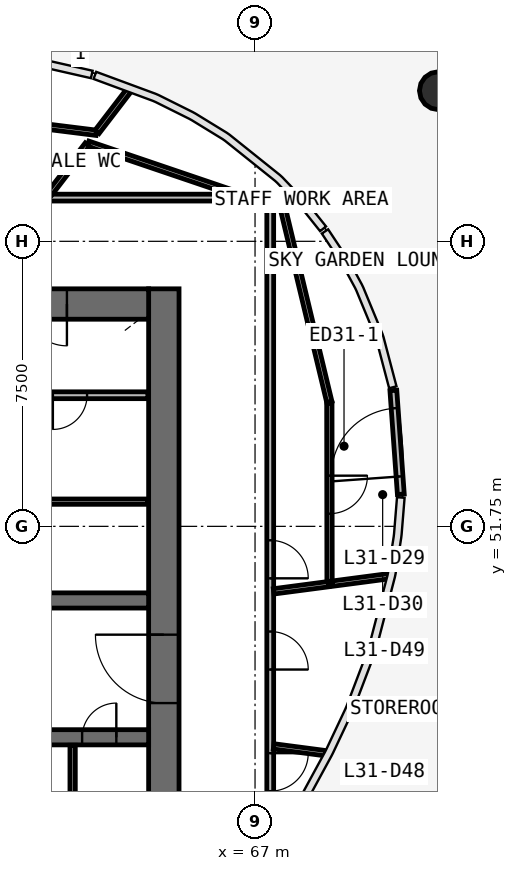
"""IFC4 building model, lengths in metres.
Left out: names, types, materials, properties, quantities, classifications, styles, units other than length and angle.
Written with IfcOpenShell. Run it as: python <this file> out.ifc"""

import sys

from ifc_helpers import new_model, si_unit, direction, frame, frame_2d, origin, origin_2d, place, context, subcontext, project, spatial, rectangle, circle, extrude, source, transform, mapped, element, fill, save


model = new_model("IFC4")
c1 = context("Model", 3, precision=1e-05, world=origin(), true_north=direction((0.0, 1.0)))
c2 = subcontext(c1, "Body", "Model", "MODEL_VIEW")
j1 = project(units=[si_unit("LENGTHUNIT", "METRE"), si_unit("PLANEANGLEUNIT", "RADIAN")], contexts=[c1])
p1 = place(None, origin())
s1 = spatial("IfcSite", under=j1, at=p1, CompositionType="ELEMENT")
p2 = place(p1, origin())
s2 = spatial("IfcBuilding", under=s1, at=p2, CompositionType="ELEMENT")
p3 = place(p2, frame((0.0, 0.0, 133.1)))
s3 = spatial("IfcBuildingStorey", under=s2, at=p3, CompositionType="ELEMENT", Elevation=133.1)
p4 = place(p3, frame((64.6, 38.0, 0.0), z_axis=(0.0, 0.0, 1.0), x_axis=(0.0, 1.0, 0.0)))
e1 = element("IfcWall", 1, at=p4, inside=s3, PredefinedType="SHEAR", context=c2, shape_type="SweptSolid", body=[
    extrude(rectangle(XDim=20.0, YDim=0.8, at=frame_2d((10.0, 0.0))), origin(), (0.0, 0.0, 1.0), 3.9),
])
p5 = place(p4, frame((9.1, 0.0, 0.0)))
e2 = element("IfcOpeningElement", 2, at=p5, cuts=e1, PredefinedType="OPENING", context=c2, shape_type="SweptSolid", body=[
    extrude(rectangle(XDim=1.8, YDim=2.1, at=frame_2d((0.9, 1.05))), frame((0.0, 0.41, 0.0), z_axis=(0.0, -1.0, 0.0), x_axis=(1.0, 0.0, 0.0)), (0.0, 0.0, 1.0), 0.82),
])
p6 = place(p3, frame((64.2, 57.6, 0.0), z_axis=(0.0, 0.0, 1.0), x_axis=(-1.0, 0.0, 0.0)))
e3 = element("IfcWall", 3, at=p6, inside=s3, PredefinedType="SHEAR", context=c2, shape_type="SweptSolid", body=[
    extrude(rectangle(XDim=24.4, YDim=0.8, at=frame_2d((12.2, 0.0))), origin(), (0.0, 0.0, 1.0), 3.9),
])
p7 = place(p6, frame((21.65, 0.0, 0.0)))
e4 = element("IfcOpeningElement", 4, at=p7, cuts=e3, PredefinedType="OPENING", context=c2, shape_type="SweptSolid", body=[
    extrude(rectangle(XDim=1.1, YDim=2.1, at=frame_2d((0.55, 1.05))), frame((0.0, 0.41, 0.0), z_axis=(0.0, -1.0, 0.0), x_axis=(1.0, 0.0, 0.0)), (0.0, 0.0, 1.0), 0.82),
])
p8 = place(p6, frame((2.15, 0.0, 0.0)))
e5 = element("IfcOpeningElement", 5, at=p8, cuts=e3, PredefinedType="OPENING", context=c2, shape_type="SweptSolid", body=[
    extrude(rectangle(XDim=1.1, YDim=2.1, at=frame_2d((0.55, 1.05))), frame((0.0, 0.41, 0.0), z_axis=(0.0, -1.0, 0.0), x_axis=(1.0, 0.0, 0.0)), (0.0, 0.0, 1.0), 0.82),
])
p9 = place(p3, frame((39.8, 49.8, 0.0), z_axis=(0.0, 0.0, 1.0), x_axis=(1.0, 0.0, 0.0)))
e6 = element("IfcWall", 6, at=p9, inside=s3, PredefinedType="SHEAR", context=c2, shape_type="SweptSolid", body=[
    extrude(rectangle(XDim=24.4, YDim=0.4, at=frame_2d((12.2, 0.0))), origin(), (0.0, 0.0, 1.0), 3.9),
])
p10 = place(p9, frame((13.6, 0.0, 0.0)))
e7 = element("IfcOpeningElement", 7, at=p10, cuts=e6, PredefinedType="OPENING", context=c2, shape_type="SweptSolid", body=[
    extrude(rectangle(XDim=1.1, YDim=2.1, at=frame_2d((0.55, 1.05))), frame((0.0, 0.21, 0.0), z_axis=(0.0, -1.0, 0.0), x_axis=(1.0, 0.0, 0.0)), (0.0, 0.0, 1.0), 0.42),
])
p11 = place(p9, frame((16.1, 0.0, 0.0)))
e8 = element("IfcOpeningElement", 8, at=p11, cuts=e6, PredefinedType="OPENING", context=c2, shape_type="SweptSolid", body=[
    extrude(rectangle(XDim=1.1, YDim=2.1, at=frame_2d((0.55, 1.05))), frame((0.0, 0.21, 0.0), z_axis=(0.0, -1.0, 0.0), x_axis=(1.0, 0.0, 0.0)), (0.0, 0.0, 1.0), 0.42),
])
p12 = place(p9, frame((18.6, 0.0, 0.0)))
e9 = element("IfcOpeningElement", 9, at=p12, cuts=e6, PredefinedType="OPENING", context=c2, shape_type="SweptSolid", body=[
    extrude(rectangle(XDim=1.1, YDim=2.1, at=frame_2d((0.55, 1.05))), frame((0.0, 0.21, 0.0), z_axis=(0.0, -1.0, 0.0), x_axis=(1.0, 0.0, 0.0)), (0.0, 0.0, 1.0), 0.42),
])
p13 = place(p9, frame((4.7, 0.0, 0.0)))
e10 = element("IfcOpeningElement", 10, at=p13, cuts=e6, PredefinedType="OPENING", context=c2, shape_type="SweptSolid", body=[
    extrude(rectangle(XDim=1.1, YDim=2.1, at=frame_2d((0.55, 1.05))), frame((0.0, 0.21, 0.0), z_axis=(0.0, -1.0, 0.0), x_axis=(1.0, 0.0, 0.0)), (0.0, 0.0, 1.0), 0.42),
])
p14 = place(p9, frame((7.2, 0.0, 0.0)))
e11 = element("IfcOpeningElement", 11, at=p14, cuts=e6, PredefinedType="OPENING", context=c2, shape_type="SweptSolid", body=[
    extrude(rectangle(XDim=1.1, YDim=2.1, at=frame_2d((0.55, 1.05))), frame((0.0, 0.21, 0.0), z_axis=(0.0, -1.0, 0.0), x_axis=(1.0, 0.0, 0.0)), (0.0, 0.0, 1.0), 0.42),
])
p15 = place(p9, frame((9.7, 0.0, 0.0)))
e12 = element("IfcOpeningElement", 12, at=p15, cuts=e6, PredefinedType="OPENING", context=c2, shape_type="SweptSolid", body=[
    extrude(rectangle(XDim=1.1, YDim=2.1, at=frame_2d((0.55, 1.05))), frame((0.0, 0.21, 0.0), z_axis=(0.0, -1.0, 0.0), x_axis=(1.0, 0.0, 0.0)), (0.0, 0.0, 1.0), 0.42),
])
p16 = place(p9, frame((20.65, 0.0, 0.0)))
e13 = element("IfcOpeningElement", 13, at=p16, cuts=e6, PredefinedType="OPENING", context=c2, shape_type="SweptSolid", body=[
    extrude(rectangle(XDim=0.9, YDim=2.1, at=frame_2d((0.45, 1.05))), frame((0.0, 0.21, 0.0), z_axis=(0.0, -1.0, 0.0), x_axis=(1.0, 0.0, 0.0)), (0.0, 0.0, 1.0), 0.42),
])
p17 = place(p9, frame((11.85, 0.0, 0.0)))
e14 = element("IfcOpeningElement", 14, at=p17, cuts=e6, PredefinedType="OPENING", context=c2, shape_type="SweptSolid", body=[
    extrude(rectangle(XDim=0.9, YDim=2.1, at=frame_2d((0.45, 1.05))), frame((0.0, 0.21, 0.0), z_axis=(0.0, -1.0, 0.0), x_axis=(1.0, 0.0, 0.0)), (0.0, 0.0, 1.0), 0.42),
])
p18 = place(p3, frame((39.8, 46.2, 0.0), z_axis=(0.0, 0.0, 1.0), x_axis=(1.0, 0.0, 0.0)))
e15 = element("IfcWall", 15, at=p18, inside=s3, PredefinedType="SHEAR", context=c2, shape_type="SweptSolid", body=[
    extrude(rectangle(XDim=24.4, YDim=0.4, at=frame_2d((12.2, 0.0))), origin(), (0.0, 0.0, 1.0), 3.9),
])
p19 = place(p18, frame((13.6, 0.0, 0.0)))
e16 = element("IfcOpeningElement", 16, at=p19, cuts=e15, PredefinedType="OPENING", context=c2, shape_type="SweptSolid", body=[
    extrude(rectangle(XDim=1.1, YDim=2.1, at=frame_2d((0.55, 1.05))), frame((0.0, 0.21, 0.0), z_axis=(0.0, -1.0, 0.0), x_axis=(1.0, 0.0, 0.0)), (0.0, 0.0, 1.0), 0.42),
])
p20 = place(p18, frame((16.1, 0.0, 0.0)))
e17 = element("IfcOpeningElement", 17, at=p20, cuts=e15, PredefinedType="OPENING", context=c2, shape_type="SweptSolid", body=[
    extrude(rectangle(XDim=1.1, YDim=2.1, at=frame_2d((0.55, 1.05))), frame((0.0, 0.21, 0.0), z_axis=(0.0, -1.0, 0.0), x_axis=(1.0, 0.0, 0.0)), (0.0, 0.0, 1.0), 0.42),
])
p21 = place(p18, frame((18.6, 0.0, 0.0)))
e18 = element("IfcOpeningElement", 18, at=p21, cuts=e15, PredefinedType="OPENING", context=c2, shape_type="SweptSolid", body=[
    extrude(rectangle(XDim=1.1, YDim=2.1, at=frame_2d((0.55, 1.05))), frame((0.0, 0.21, 0.0), z_axis=(0.0, -1.0, 0.0), x_axis=(1.0, 0.0, 0.0)), (0.0, 0.0, 1.0), 0.42),
])
p22 = place(p18, frame((4.7, 0.0, 0.0)))
e19 = element("IfcOpeningElement", 19, at=p22, cuts=e15, PredefinedType="OPENING", context=c2, shape_type="SweptSolid", body=[
    extrude(rectangle(XDim=1.1, YDim=2.1, at=frame_2d((0.55, 1.05))), frame((0.0, 0.21, 0.0), z_axis=(0.0, -1.0, 0.0), x_axis=(1.0, 0.0, 0.0)), (0.0, 0.0, 1.0), 0.42),
])
p23 = place(p18, frame((7.2, 0.0, 0.0)))
e20 = element("IfcOpeningElement", 20, at=p23, cuts=e15, PredefinedType="OPENING", context=c2, shape_type="SweptSolid", body=[
    extrude(rectangle(XDim=1.1, YDim=2.1, at=frame_2d((0.55, 1.05))), frame((0.0, 0.21, 0.0), z_axis=(0.0, -1.0, 0.0), x_axis=(1.0, 0.0, 0.0)), (0.0, 0.0, 1.0), 0.42),
])
p24 = place(p18, frame((9.7, 0.0, 0.0)))
e21 = element("IfcOpeningElement", 21, at=p24, cuts=e15, PredefinedType="OPENING", context=c2, shape_type="SweptSolid", body=[
    extrude(rectangle(XDim=1.1, YDim=2.1, at=frame_2d((0.55, 1.05))), frame((0.0, 0.21, 0.0), z_axis=(0.0, -1.0, 0.0), x_axis=(1.0, 0.0, 0.0)), (0.0, 0.0, 1.0), 0.42),
])
p25 = place(p18, frame((20.65, 0.0, 0.0)))
e22 = element("IfcOpeningElement", 22, at=p25, cuts=e15, PredefinedType="OPENING", context=c2, shape_type="SweptSolid", body=[
    extrude(rectangle(XDim=0.9, YDim=2.1, at=frame_2d((0.45, 1.05))), frame((0.0, 0.21, 0.0), z_axis=(0.0, -1.0, 0.0), x_axis=(1.0, 0.0, 0.0)), (0.0, 0.0, 1.0), 0.42),
])
p26 = place(p18, frame((22.65, 0.0, 0.0)))
e23 = element("IfcOpeningElement", 23, at=p26, cuts=e15, PredefinedType="OPENING", context=c2, shape_type="SweptSolid", body=[
    extrude(rectangle(XDim=0.9, YDim=2.1, at=frame_2d((0.45, 1.05))), frame((0.0, 0.21, 0.0), z_axis=(0.0, -1.0, 0.0), x_axis=(1.0, 0.0, 0.0)), (0.0, 0.0, 1.0), 0.42),
])
p27 = place(p18, frame((0.85, 0.0, 0.0)))
e24 = element("IfcOpeningElement", 24, at=p27, cuts=e15, PredefinedType="OPENING", context=c2, shape_type="SweptSolid", body=[
    extrude(rectangle(XDim=0.9, YDim=2.1, at=frame_2d((0.45, 1.05))), frame((0.0, 0.21, 0.0), z_axis=(0.0, -1.0, 0.0), x_axis=(1.0, 0.0, 0.0)), (0.0, 0.0, 1.0), 0.42),
])
p28 = place(p18, frame((2.85, 0.0, 0.0)))
e25 = element("IfcOpeningElement", 25, at=p28, cuts=e15, PredefinedType="OPENING", context=c2, shape_type="SweptSolid", body=[
    extrude(rectangle(XDim=0.9, YDim=2.1, at=frame_2d((0.45, 1.05))), frame((0.0, 0.21, 0.0), z_axis=(0.0, -1.0, 0.0), x_axis=(1.0, 0.0, 0.0)), (0.0, 0.0, 1.0), 0.42),
])
p29 = place(p18, frame((11.85, 0.0, 0.0)))
e26 = element("IfcOpeningElement", 26, at=p29, cuts=e15, PredefinedType="OPENING", context=c2, shape_type="SweptSolid", body=[
    extrude(rectangle(XDim=0.9, YDim=2.1, at=frame_2d((0.45, 1.05))), frame((0.0, 0.21, 0.0), z_axis=(0.0, -1.0, 0.0), x_axis=(1.0, 0.0, 0.0)), (0.0, 0.0, 1.0), 0.42),
])
m1 = source(origin(), c2, "Body", "SweptSolid", [
    extrude(circle(Radius=0.5, at=origin_2d()), origin(), (0.0, 0.0, 1.0), 4.22),
])
p30 = place(p3, frame((71.826, 63.213, -0.32), z_axis=(0.0, 0.0, 1.0), x_axis=(1.0, 0.0, 0.0)))
e27 = element("IfcColumn", 27, at=p30, inside=s3, PredefinedType="COLUMN", context=c2, shape_type="MappedRepresentation", body=[
    mapped(m1, transform((0.0, 0.0, 0.0), scale=1.0)),
])
p31 = place(p3, frame((70.836, 52.594, 0.0), z_axis=(0.0, 0.0, 1.0), x_axis=(-0.071747420295, 0.997422832945, 0.0)))
e28 = element("IfcWall", 28, at=p31, inside=s3, PredefinedType="STANDARD", context=c2, shape_type="SweptSolid", body=[
    extrude(rectangle(XDim=2.739, YDim=0.18, at=frame_2d((1.37, 0.0))), origin(), (0.0, 0.0, 1.0), 3.58),
])
p32 = place(p31, frame((0.469, 0.0, 0.0)))
e29 = element("IfcOpeningElement", 29, at=p32, cuts=e28, PredefinedType="OPENING", context=c2, shape_type="SweptSolid", body=[
    extrude(rectangle(XDim=1.8, YDim=2.4, at=frame_2d((0.9, 1.2))), frame((0.0, 0.1, 0.0), z_axis=(0.0, -1.0, 0.0), x_axis=(1.0, 0.0, 0.0)), (0.0, 0.0, 1.0), 0.2),
])
p33 = place(p3, frame((36.6, 60.4, 0.0), z_axis=(0.0, 0.0, 1.0), x_axis=(1.0, 0.0, 0.0)))
e30 = element("IfcWall", 30, at=p33, inside=s3, PredefinedType="PARTITIONING", context=c2, shape_type="SweptSolid", body=[
    extrude(rectangle(XDim=30.8, YDim=0.18, at=frame_2d((15.4, 0.0))), origin(), (0.0, 0.0, 1.0), 2.88),
])
p34 = place(p33, frame((22.25, 0.0, 0.0)))
e31 = element("IfcOpeningElement", 31, at=p34, cuts=e30, PredefinedType="OPENING", context=c2, shape_type="SweptSolid", body=[
    extrude(rectangle(XDim=0.9, YDim=2.1, at=frame_2d((0.45, 1.05))), frame((0.0, 0.1, 0.0), z_axis=(0.0, -1.0, 0.0), x_axis=(1.0, 0.0, 0.0)), (0.0, 0.0, 1.0), 0.2),
])
p35 = place(p33, frame((19.65, 0.0, 0.0)))
e32 = element("IfcOpeningElement", 32, at=p35, cuts=e30, PredefinedType="OPENING", context=c2, shape_type="SweptSolid", body=[
    extrude(rectangle(XDim=0.9, YDim=2.1, at=frame_2d((0.45, 1.05))), frame((0.0, 0.1, 0.0), z_axis=(0.0, -1.0, 0.0), x_axis=(1.0, 0.0, 0.0)), (0.0, 0.0, 1.0), 0.2),
])
p36 = place(p33, frame((17.25, 0.0, 0.0)))
e33 = element("IfcOpeningElement", 33, at=p36, cuts=e30, PredefinedType="OPENING", context=c2, shape_type="SweptSolid", body=[
    extrude(rectangle(XDim=0.9, YDim=2.1, at=frame_2d((0.45, 1.05))), frame((0.0, 0.1, 0.0), z_axis=(0.0, -1.0, 0.0), x_axis=(1.0, 0.0, 0.0)), (0.0, 0.0, 1.0), 0.2),
])
p37 = place(p33, frame((14.95, 0.0, 0.0)))
e34 = element("IfcOpeningElement", 34, at=p37, cuts=e30, PredefinedType="OPENING", context=c2, shape_type="SweptSolid", body=[
    extrude(rectangle(XDim=1.0, YDim=2.1, at=frame_2d((0.5, 1.05))), frame((0.0, 0.1, 0.0), z_axis=(0.0, -1.0, 0.0), x_axis=(1.0, 0.0, 0.0)), (0.0, 0.0, 1.0), 0.2),
])
p38 = place(p33, frame((8.95, 0.0, 0.0)))
e35 = element("IfcOpeningElement", 35, at=p38, cuts=e30, PredefinedType="OPENING", context=c2, shape_type="SweptSolid", body=[
    extrude(rectangle(XDim=1.0, YDim=2.1, at=frame_2d((0.5, 1.05))), frame((0.0, 0.1, 0.0), z_axis=(0.0, -1.0, 0.0), x_axis=(1.0, 0.0, 0.0)), (0.0, 0.0, 1.0), 0.2),
])
p39 = place(p3, frame((67.4, 60.37, 0.0), z_axis=(0.0, 0.0, 1.0), x_axis=(0.0, -1.0, 0.0)))
e36 = element("IfcWall", 36, at=p39, inside=s3, PredefinedType="PARTITIONING", context=c2, shape_type="SweptSolid", body=[
    extrude(rectangle(XDim=23.638, YDim=0.18, at=frame_2d((11.819, 0.0))), origin(), (0.0, 0.0, 1.0), 2.88),
])
p40 = place(p39, frame((8.988, 0.0, 0.0)))
e37 = element("IfcOpeningElement", 37, at=p40, cuts=e36, PredefinedType="OPENING", context=c2, shape_type="SweptSolid", body=[
    extrude(rectangle(XDim=1.0, YDim=2.1, at=frame_2d((0.5, 1.05))), frame((0.0, 0.1, 0.0), z_axis=(0.0, -1.0, 0.0), x_axis=(1.0, 0.0, 0.0)), (0.0, 0.0, 1.0), 0.2),
])
p41 = place(p39, frame((14.587, 0.0, 0.0)))
e38 = element("IfcOpeningElement", 38, at=p41, cuts=e36, PredefinedType="OPENING", context=c2, shape_type="SweptSolid", body=[
    extrude(rectangle(XDim=1.0, YDim=2.1, at=frame_2d((0.5, 1.05))), frame((0.0, 0.1, 0.0), z_axis=(0.0, -1.0, 0.0), x_axis=(1.0, 0.0, 0.0)), (0.0, 0.0, 1.0), 0.2),
])
p42 = place(p39, frame((11.387, 0.0, 0.0)))
e39 = element("IfcOpeningElement", 39, at=p42, cuts=e36, PredefinedType="OPENING", context=c2, shape_type="SweptSolid", body=[
    extrude(rectangle(XDim=1.0, YDim=2.1, at=frame_2d((0.5, 1.05))), frame((0.0, 0.1, 0.0), z_axis=(0.0, -1.0, 0.0), x_axis=(1.0, 0.0, 0.0)), (0.0, 0.0, 1.0), 0.2),
])
p43 = place(p3, frame((64.18, 55.2, 0.0), z_axis=(0.0, 0.0, 1.0), x_axis=(-1.0, 0.0, 0.0)))
e40 = element("IfcWall", 40, at=p43, inside=s3, PredefinedType="PARTITIONING", context=c2, shape_type="SweptSolid", body=[
    extrude(rectangle(XDim=3.95, YDim=0.18, at=frame_2d((1.975, 0.0))), origin(), (0.0, 0.0, 1.0), 3.58),
])
p44 = place(p43, frame((1.6, 0.0, 0.0)))
e41 = element("IfcOpeningElement", 41, at=p44, cuts=e40, PredefinedType="OPENING", context=c2, shape_type="SweptSolid", body=[
    extrude(rectangle(XDim=0.9, YDim=2.1, at=frame_2d((0.45, 1.05))), frame((0.0, 0.1, 0.0), z_axis=(0.0, -1.0, 0.0), x_axis=(1.0, 0.0, 0.0)), (0.0, 0.0, 1.0), 0.2),
])
p45 = place(p3, frame((68.955, 55.023, 0.0), z_axis=(0.0, 0.0, 1.0), x_axis=(-0.233630483272, 0.97232545852, 0.0)))
e42 = element("IfcWall", 42, at=p45, inside=s3, PredefinedType="PARTITIONING", context=c2, shape_type="SweptSolid", body=[
    extrude(rectangle(XDim=5.199, YDim=0.14, at=frame_2d((2.599, 0.0))), origin(), (0.0, 0.0, 1.0), 2.88),
])
p46 = place(p3, frame((68.955, 54.993, 0.0), z_axis=(0.0, 0.0, 1.0), x_axis=(0.001230894544, -0.999999242449, 0.0)))
e43 = element("IfcWall", 43, at=p46, inside=s3, PredefinedType="PARTITIONING", context=c2, shape_type="SweptSolid", body=[
    extrude(rectangle(XDim=4.76, YDim=0.14, at=frame_2d((2.38, 0.0))), origin(), (0.0, 0.0, 1.0), 2.88),
])
p47 = place(p46, frame((1.91, 0.0, 0.0)))
e44 = element("IfcOpeningElement", 44, at=p47, cuts=e43, PredefinedType="OPENING", context=c2, shape_type="SweptSolid", body=[
    extrude(rectangle(XDim=1.0, YDim=2.1, at=frame_2d((0.5, 1.05))), frame((0.0, 0.08, 0.0), z_axis=(0.0, -1.0, 0.0), x_axis=(1.0, 0.0, 0.0)), (0.0, 0.0, 1.0), 0.16),
])
p48 = place(p3, frame((62.823, 62.105, 0.0), z_axis=(0.0, 0.0, 1.0), x_axis=(-0.992341485201, 0.123524802163, 0.0)))
e45 = element("IfcWall", 45, at=p48, inside=s3, PredefinedType="PARTITIONING", context=c2, shape_type="SweptSolid", body=[
    extrude(rectangle(XDim=4.773, YDim=0.14, at=frame_2d((2.387, 0.0))), origin(), (0.0, 0.0, 1.0), 2.88),
])
p49 = place(p3, frame((66.527, 60.49, 0.0), z_axis=(0.0, 0.0, 1.0), x_axis=(-0.946923916586, 0.321457767362, 0.0)))
e46 = element("IfcWall", 46, at=p49, inside=s3, PredefinedType="PARTITIONING", context=c2, shape_type="SweptSolid", body=[
    extrude(rectangle(XDim=4.141, YDim=0.14, at=frame_2d((2.071, 0.0))), origin(), (0.0, 0.0, 1.0), 2.88),
])
p50 = place(p3, frame((64.18, 52.4, 0.0), z_axis=(0.0, 0.0, 1.0), x_axis=(-1.0, 0.0, 0.0)))
e47 = element("IfcWall", 47, at=p50, inside=s3, PredefinedType="PARTITIONING", context=c2, shape_type="SweptSolid", body=[
    extrude(rectangle(XDim=3.95, YDim=0.14, at=frame_2d((1.975, 0.0))), origin(), (0.0, 0.0, 1.0), 2.88),
])
p51 = place(p3, frame((62.2, 43.6, 0.0), z_axis=(0.0, 0.0, 1.0), x_axis=(0.0, 1.0, 0.0)))
e48 = element("IfcWall", 48, at=p51, inside=s3, PredefinedType="PARTITIONING", context=c2, shape_type="SweptSolid", body=[
    extrude(rectangle(XDim=2.39, YDim=0.14, at=frame_2d((1.195, 0.0))), origin(), (0.0, 0.0, 1.0), 2.88),
])
p52 = place(p3, frame((61.584, 60.49, 0.0), z_axis=(0.0, 0.0, 1.0), x_axis=(0.608758070133, 0.793355917636, 0.0)))
e49 = element("IfcWall", 49, at=p52, inside=s3, PredefinedType="PARTITIONING", context=c2, shape_type="SweptSolid", body=[
    extrude(rectangle(XDim=1.648, YDim=0.14, at=frame_2d((0.824, 0.0))), origin(), (0.0, 0.0, 1.0), 2.88),
])
p53 = place(p3, frame((69.031, 50.242, 0.0), z_axis=(0.0, 0.0, 1.0), x_axis=(0.991444899248, 0.130525904535, 0.0)))
e50 = element("IfcWall", 50, at=p53, inside=s3, PredefinedType="PARTITIONING", context=c2, shape_type="SweptSolid", body=[
    extrude(rectangle(XDim=1.504, YDim=0.14, at=frame_2d((0.752, 0.0))), origin(), (0.0, 0.0, 1.0), 2.88),
])
p54 = place(p3, frame((67.49, 50.039, 0.0), z_axis=(0.0, 0.0, 1.0), x_axis=(0.991450865751, 0.130480576336, 0.0)))
e51 = element("IfcWall", 51, at=p54, inside=s3, PredefinedType="PARTITIONING", context=c2, shape_type="SweptSolid", body=[
    extrude(rectangle(XDim=1.454, YDim=0.14, at=frame_2d((0.727, 0.0))), origin(), (0.0, 0.0, 1.0), 2.88),
])
p55 = place(p3, frame((67.49, 45.961, 0.0), z_axis=(0.0, 0.0, 1.0), x_axis=(0.991453697095, -0.130459060692, 0.0)))
e52 = element("IfcWall", 52, at=p55, inside=s3, PredefinedType="PARTITIONING", context=c2, shape_type="SweptSolid", body=[
    extrude(rectangle(XDim=1.389, YDim=0.14, at=frame_2d((0.694, 0.0))), origin(), (0.0, 0.0, 1.0), 2.88),
])
p56 = place(p3, frame((62.842, 62.129, 0.0), z_axis=(0.0, 0.0, 1.0), x_axis=(0.608734731497, 0.793373825299, 0.0)))
e53 = element("IfcWall", 53, at=p56, inside=s3, PredefinedType="PARTITIONING", context=c2, shape_type="SweptSolid", body=[
    extrude(rectangle(XDim=1.403, YDim=0.14, at=frame_2d((0.701, 0.0))), origin(), (0.0, 0.0, 1.0), 2.88),
])
m2 = source(origin(), c2, "Body", "SweptSolid", [
    extrude(rectangle(XDim=1.8, YDim=2.4, at=frame_2d((0.9, 1.2))), frame((0.0, 0.025, 0.0), z_axis=(0.0, -1.0, 0.0), x_axis=(1.0, 0.0, 0.0)), (0.0, 0.0, 1.0), 0.05),
])
p57 = place(p32, origin())
e54 = element("IfcDoor", 54, at=p57, inside=s3, OperationType="DOUBLE_DOOR_SINGLE_SWING", PredefinedType="DOOR", context=c2, shape_type="MappedRepresentation", body=[
    mapped(m2, transform((0.0, 0.0, 0.0), scale=1.0)),
])
fill(e29, e54)
m3 = source(origin(), c2, "Body", "SweptSolid", [
    extrude(rectangle(XDim=1.8, YDim=2.1, at=frame_2d((0.9, 1.05))), frame((0.0, 0.025, 0.0), z_axis=(0.0, -1.0, 0.0), x_axis=(1.0, 0.0, 0.0)), (0.0, 0.0, 1.0), 0.05),
])
p58 = place(p5, origin())
e55 = element("IfcDoor", 55, at=p58, inside=s3, OperationType="SINGLE_SWING_RIGHT", PredefinedType="DOOR", context=c2, shape_type="MappedRepresentation", body=[
    mapped(m3, transform((0.0, 0.0, 0.0), scale=1.0)),
])
fill(e2, e55)
m4 = source(origin(), c2, "Body", "SweptSolid", [
    extrude(rectangle(XDim=1.1, YDim=2.1, at=frame_2d((0.55, 1.05))), frame((0.0, 0.025, 0.0), z_axis=(0.0, -1.0, 0.0), x_axis=(1.0, 0.0, 0.0)), (0.0, 0.0, 1.0), 0.05),
])
p59 = place(p8, origin())
e56 = element("IfcDoor", 56, at=p59, inside=s3, OperationType="SINGLE_SWING_LEFT", PredefinedType="DOOR", context=c2, shape_type="MappedRepresentation", body=[
    mapped(m4, transform((0.0, 0.0, 0.0), scale=1.0)),
])
fill(e5, e56)
m5 = source(origin(), c2, "Body", "SweptSolid", [
    extrude(rectangle(XDim=1.0, YDim=2.1, at=frame_2d((0.5, 1.05))), frame((0.0, 0.025, 0.0), z_axis=(0.0, -1.0, 0.0), x_axis=(1.0, 0.0, 0.0)), (0.0, 0.0, 1.0), 0.05),
])
p60 = place(p40, origin())
e57 = element("IfcDoor", 57, at=p60, inside=s3, OperationType="SINGLE_SWING_RIGHT", PredefinedType="DOOR", context=c2, shape_type="MappedRepresentation", body=[
    mapped(m5, transform((0.0, 0.0, 0.0), scale=1.0)),
])
fill(e37, e57)
p61 = place(p47, origin())
e58 = element("IfcDoor", 58, at=p61, inside=s3, OperationType="SINGLE_SWING_LEFT", PredefinedType="DOOR", context=c2, shape_type="MappedRepresentation", body=[
    mapped(m5, transform((0.0, 0.0, 0.0), scale=1.0)),
])
fill(e44, e58)
p62 = place(p41, origin())
e59 = element("IfcDoor", 59, at=p62, inside=s3, OperationType="SINGLE_SWING_LEFT", PredefinedType="DOOR", context=c2, shape_type="MappedRepresentation", body=[
    mapped(m5, transform((0.0, 0.0, 0.0), scale=1.0)),
])
fill(e38, e59)
p63 = place(p42, origin())
e60 = element("IfcDoor", 60, at=p63, inside=s3, OperationType="SINGLE_SWING_RIGHT", PredefinedType="DOOR", context=c2, shape_type="MappedRepresentation", body=[
    mapped(m5, transform((0.0, 0.0, 0.0), scale=1.0)),
])
fill(e39, e60)
m6 = source(origin(), c2, "Body", "SweptSolid", [
    extrude(rectangle(XDim=0.9, YDim=2.1, at=frame_2d((0.45, 1.05))), frame((0.0, 0.025, 0.0), z_axis=(0.0, -1.0, 0.0), x_axis=(1.0, 0.0, 0.0)), (0.0, 0.0, 1.0), 0.05),
])
p64 = place(p26, origin())
e61 = element("IfcDoor", 61, at=p64, inside=s3, OperationType="SINGLE_SWING_RIGHT", PredefinedType="DOOR", context=c2, shape_type="MappedRepresentation", body=[
    mapped(m6, transform((0.0, 0.0, 0.0), scale=1.0)),
])
fill(e23, e61)
p65 = place(p44, origin())
e62 = element("IfcDoor", 62, at=p65, inside=s3, OperationType="SINGLE_SWING_RIGHT", PredefinedType="DOOR", context=c2, shape_type="MappedRepresentation", body=[
    mapped(m6, transform((0.0, 0.0, 0.0), scale=1.0)),
])
fill(e41, e62)
save(model, sys.argv[1])
